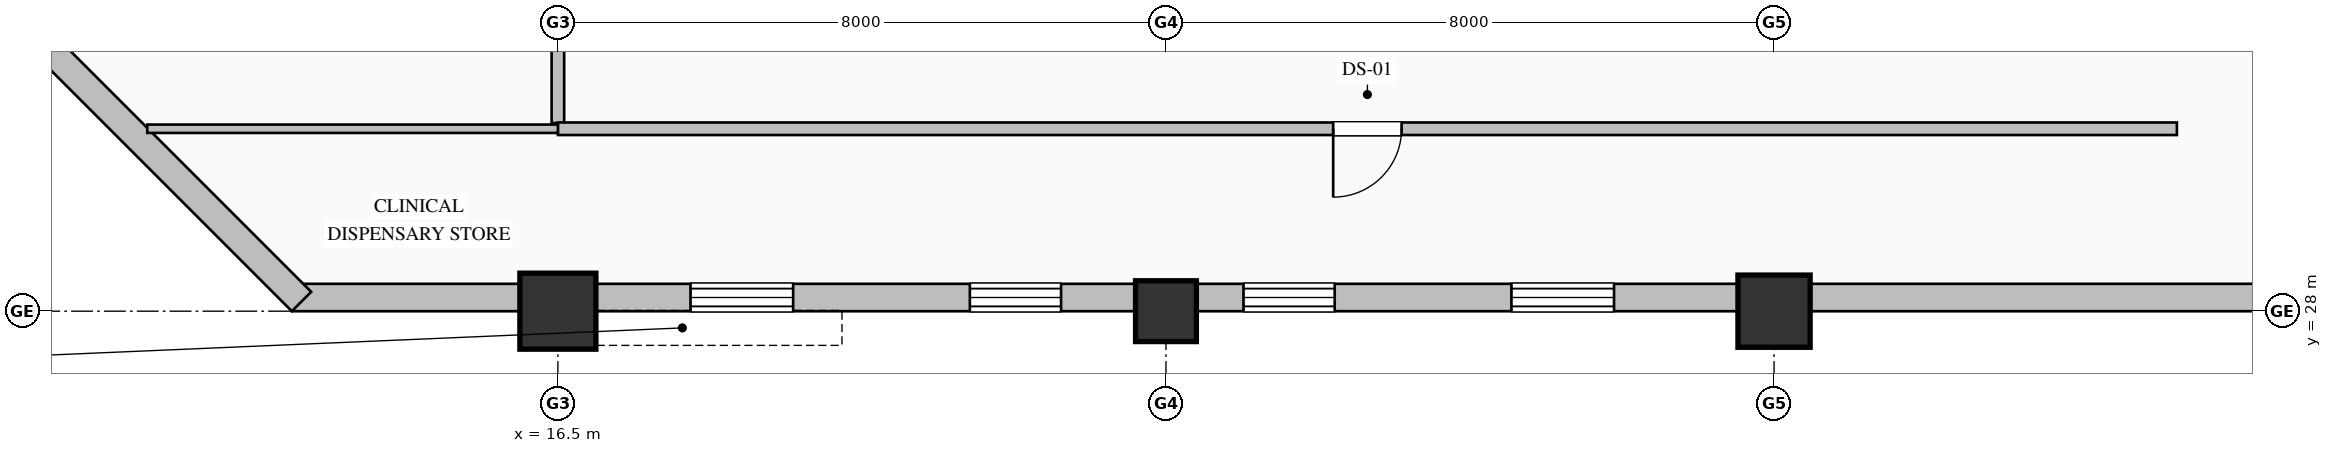
"""IFC4 building model, lengths in metres.
Left out: names, types, materials, properties, quantities, classifications, styles, units other than length and angle.
Written with IfcOpenShell. Run it as: python <this file> out.ifc"""

import sys

from ifc_helpers import new_model, si_unit, direction, frame, frame_2d, origin, origin_2d, place, context, subcontext, project, spatial, rectangle, hollow_rectangle, hollow_circle, extrude, element, fill, save


model = new_model("IFC4")
c1 = context("Model", 3, precision=1e-05, world=origin(), true_north=direction((0.0, 1.0)))
c2 = subcontext(c1, "Body", "Model", "MODEL_VIEW")
j1 = project(units=[si_unit("LENGTHUNIT", "METRE"), si_unit("PLANEANGLEUNIT", "RADIAN")], contexts=[c1])
p1 = place(None, origin())
s1 = spatial("IfcSite", under=j1, at=p1, CompositionType="ELEMENT")
p2 = place(p1, origin())
s2 = spatial("IfcBuilding", under=s1, at=p2, CompositionType="ELEMENT")
p3 = place(p2, frame((0.0, 0.0, 253.8)))
s3 = spatial("IfcBuildingStorey", under=s2, at=p3, CompositionType="ELEMENT", Elevation=253.8)
p4 = place(p3, frame((16.5, 28.0, 0.0), z_axis=(0.0, 0.0, 1.0), x_axis=(1.0, 0.0, 0.0)))
e1 = element("IfcColumn", 1, at=p4, inside=s3, PredefinedType="COLUMN", context=c2, shape_type="SweptSolid", body=[
    extrude(hollow_circle(Radius=0.5, WallThickness=0.036, at=origin_2d()), origin(), (0.0, 0.0, 1.0), 4.0),
])
p5 = place(p3, frame((24.5, 28.0, 0.0), z_axis=(0.0, 0.0, 1.0), x_axis=(1.0, 0.0, 0.0)))
e2 = element("IfcColumn", 2, at=p5, inside=s3, PredefinedType="COLUMN", context=c2, shape_type="SweptSolid", body=[
    extrude(hollow_rectangle(XDim=0.8, YDim=0.8, WallThickness=0.032, at=origin_2d()), origin(), (0.0, 0.0, 1.0), 4.0),
])
p6 = place(p3, frame((32.5, 28.0, 0.0), z_axis=(0.0, 0.0, 1.0), x_axis=(1.0, 0.0, 0.0)))
e3 = element("IfcColumn", 3, at=p6, inside=s3, PredefinedType="COLUMN", context=c2, shape_type="SweptSolid", body=[
    extrude(hollow_rectangle(XDim=0.95, YDim=0.95, WallThickness=0.036, at=origin_2d()), origin(), (0.0, 0.0, 1.0), 4.0),
])
p7 = place(p3, frame((40.52, 28.18, 0.0), z_axis=(0.0, 0.0, 1.0), x_axis=(-1.0, 0.0, 0.0)))
e4 = element("IfcWall", 4, at=p7, inside=s3, PredefinedType="SOLIDWALL", context=c2, shape_type="SweptSolid", body=[
    extrude(rectangle(XDim=27.52, YDim=0.36, at=frame_2d((13.76, 0.0))), origin(), (0.0, 0.0, 1.0), 3.187),
])
p8 = place(p7, frame((10.125, 0.0, 0.9)))
e5 = element("IfcOpeningElement", 5, at=p8, cuts=e4, PredefinedType="OPENING", context=c2, shape_type="SweptSolid", body=[
    extrude(rectangle(XDim=1.35, YDim=1.85, at=frame_2d((0.675, 0.925))), frame((0.0, 0.19, 0.0), z_axis=(0.0, -1.0, 0.0), x_axis=(1.0, 0.0, 0.0)), (0.0, 0.0, 1.0), 0.38),
])
p9 = place(p7, frame((13.8, 0.0, 0.7)))
e6 = element("IfcOpeningElement", 6, at=p9, cuts=e4, PredefinedType="OPENING", context=c2, shape_type="SweptSolid", body=[
    extrude(rectangle(XDim=1.2, YDim=1.85, at=frame_2d((0.6, 0.925))), frame((0.0, 0.19, 0.0), z_axis=(0.0, -1.0, 0.0), x_axis=(1.0, 0.0, 0.0)), (0.0, 0.0, 1.0), 0.38),
])
p10 = place(p7, frame((17.4, 0.0, 0.9)))
e7 = element("IfcOpeningElement", 7, at=p10, cuts=e4, PredefinedType="OPENING", context=c2, shape_type="SweptSolid", body=[
    extrude(rectangle(XDim=1.2, YDim=1.85, at=frame_2d((0.6, 0.925))), frame((0.0, 0.19, 0.0), z_axis=(0.0, -1.0, 0.0), x_axis=(1.0, 0.0, 0.0)), (0.0, 0.0, 1.0), 0.38),
])
p11 = place(p7, frame((20.925, 0.0, 0.9)))
e8 = element("IfcOpeningElement", 8, at=p11, cuts=e4, PredefinedType="OPENING", context=c2, shape_type="SweptSolid", body=[
    extrude(rectangle(XDim=1.35, YDim=1.85, at=frame_2d((0.675, 0.925))), frame((0.0, 0.19, 0.0), z_axis=(0.0, -1.0, 0.0), x_axis=(1.0, 0.0, 0.0)), (0.0, 0.0, 1.0), 0.38),
])
p12 = place(p3, frame((13.127, 28.127, 0.0), z_axis=(0.0, 0.0, 1.0), x_axis=(-0.707106781187, 0.707106781187, 0.0)))
e9 = element("IfcWall", 9, at=p12, inside=s3, PredefinedType="SOLIDWALL", context=c2, shape_type="SweptSolid", body=[
    extrude(rectangle(XDim=5.657, YDim=0.36, at=frame_2d((2.828, 0.0))), origin(), (0.0, 0.0, 1.0), 3.775),
])
p13 = place(p3, frame((16.5, 30.475, 0.0), z_axis=(0.0, 0.0, 1.0), x_axis=(0.0, 1.0, 0.0)))
e10 = element("IfcWall", 10, at=p13, inside=s3, PredefinedType="PARTITIONING", context=c2, shape_type="SweptSolid", body=[
    extrude(rectangle(XDim=2.051, YDim=0.165, at=frame_2d((1.025, 0.0))), origin(), (0.0, 0.0, 1.0), 3.179),
])
p14 = place(p3, frame((37.8, 30.4, 0.0), z_axis=(0.0, 0.0, 1.0), x_axis=(-1.0, 0.0, 0.0)))
e11 = element("IfcWall", 11, at=p14, inside=s3, PredefinedType="PARTITIONING", context=c2, shape_type="SweptSolid", body=[
    extrude(rectangle(XDim=21.3, YDim=0.165, at=frame_2d((10.65, 0.0))), origin(), (0.0, 0.0, 1.0), 3.775),
])
p15 = place(p14, frame((10.2, 0.0, 0.0)))
e12 = element("IfcOpeningElement", 12, at=p15, cuts=e11, PredefinedType="OPENING", context=c2, shape_type="SweptSolid", body=[
    extrude(rectangle(XDim=0.9, YDim=2.15, at=frame_2d((0.45, 1.075))), frame((0.0, 0.093, 0.0), z_axis=(0.0, -1.0, 0.0), x_axis=(1.0, 0.0, 0.0)), (0.0, 0.0, 1.0), 0.185),
])
p16 = place(p3, frame((16.5, 30.4, 0.0), z_axis=(0.0, 0.0, 1.0), x_axis=(-1.0, 0.0, 0.0)))
e13 = element("IfcWall", 13, at=p16, inside=s3, PredefinedType="MOVABLE", context=c2, shape_type="SweptSolid", body=[
    extrude(rectangle(XDim=5.402, YDim=0.11, at=frame_2d((2.701, 0.0))), origin(), (0.0, 0.0, 1.0), 3.775),
])
p17 = place(p8, origin())
e14 = element("IfcWindow", 14, at=p17, inside=s3, PartitioningType="DOUBLE_PANEL_VERTICAL", PredefinedType="WINDOW", context=c2, shape_type="SweptSolid", body=[
    extrude(rectangle(XDim=1.35, YDim=1.85, at=frame_2d((0.675, 0.925))), frame((0.0, 0.15, 0.0), z_axis=(0.0, -1.0, 0.0), x_axis=(1.0, 0.0, 0.0)), (0.0, 0.0, 1.0), 0.06),
])
fill(e5, e14)
p18 = place(p9, origin())
e15 = element("IfcWindow", 15, at=p18, inside=s3, PartitioningType="DOUBLE_PANEL_VERTICAL", PredefinedType="WINDOW", context=c2, shape_type="SweptSolid", body=[
    extrude(rectangle(XDim=1.2, YDim=1.85, at=frame_2d((0.6, 0.925))), frame((0.0, 0.15, 0.0), z_axis=(0.0, -1.0, 0.0), x_axis=(1.0, 0.0, 0.0)), (0.0, 0.0, 1.0), 0.06),
])
fill(e6, e15)
p19 = place(p10, origin())
e16 = element("IfcWindow", 16, at=p19, inside=s3, PartitioningType="DOUBLE_PANEL_VERTICAL", PredefinedType="WINDOW", context=c2, shape_type="SweptSolid", body=[
    extrude(rectangle(XDim=1.2, YDim=1.85, at=frame_2d((0.6, 0.925))), frame((0.0, 0.15, 0.0), z_axis=(0.0, -1.0, 0.0), x_axis=(1.0, 0.0, 0.0)), (0.0, 0.0, 1.0), 0.06),
])
fill(e7, e16)
p20 = place(p11, origin())
e17 = element("IfcWindow", 17, at=p20, inside=s3, PartitioningType="DOUBLE_PANEL_VERTICAL", PredefinedType="WINDOW", context=c2, shape_type="SweptSolid", body=[
    extrude(rectangle(XDim=1.35, YDim=1.85, at=frame_2d((0.675, 0.925))), frame((0.0, 0.15, 0.0), z_axis=(0.0, -1.0, 0.0), x_axis=(1.0, 0.0, 0.0)), (0.0, 0.0, 1.0), 0.06),
])
fill(e8, e17)
p21 = place(p15, origin())
e18 = element("IfcDoor", 18, at=p21, inside=s3, OperationType="SINGLE_SWING_RIGHT", PredefinedType="DOOR", context=c2, shape_type="SweptSolid", body=[
    extrude(rectangle(XDim=0.9, YDim=2.15, at=frame_2d((0.45, 1.075))), frame((0.0, 0.025, 0.0), z_axis=(0.0, -1.0, 0.0), x_axis=(1.0, 0.0, 0.0)), (0.0, 0.0, 1.0), 0.05),
])
fill(e12, e18)
save(model, sys.argv[1])
